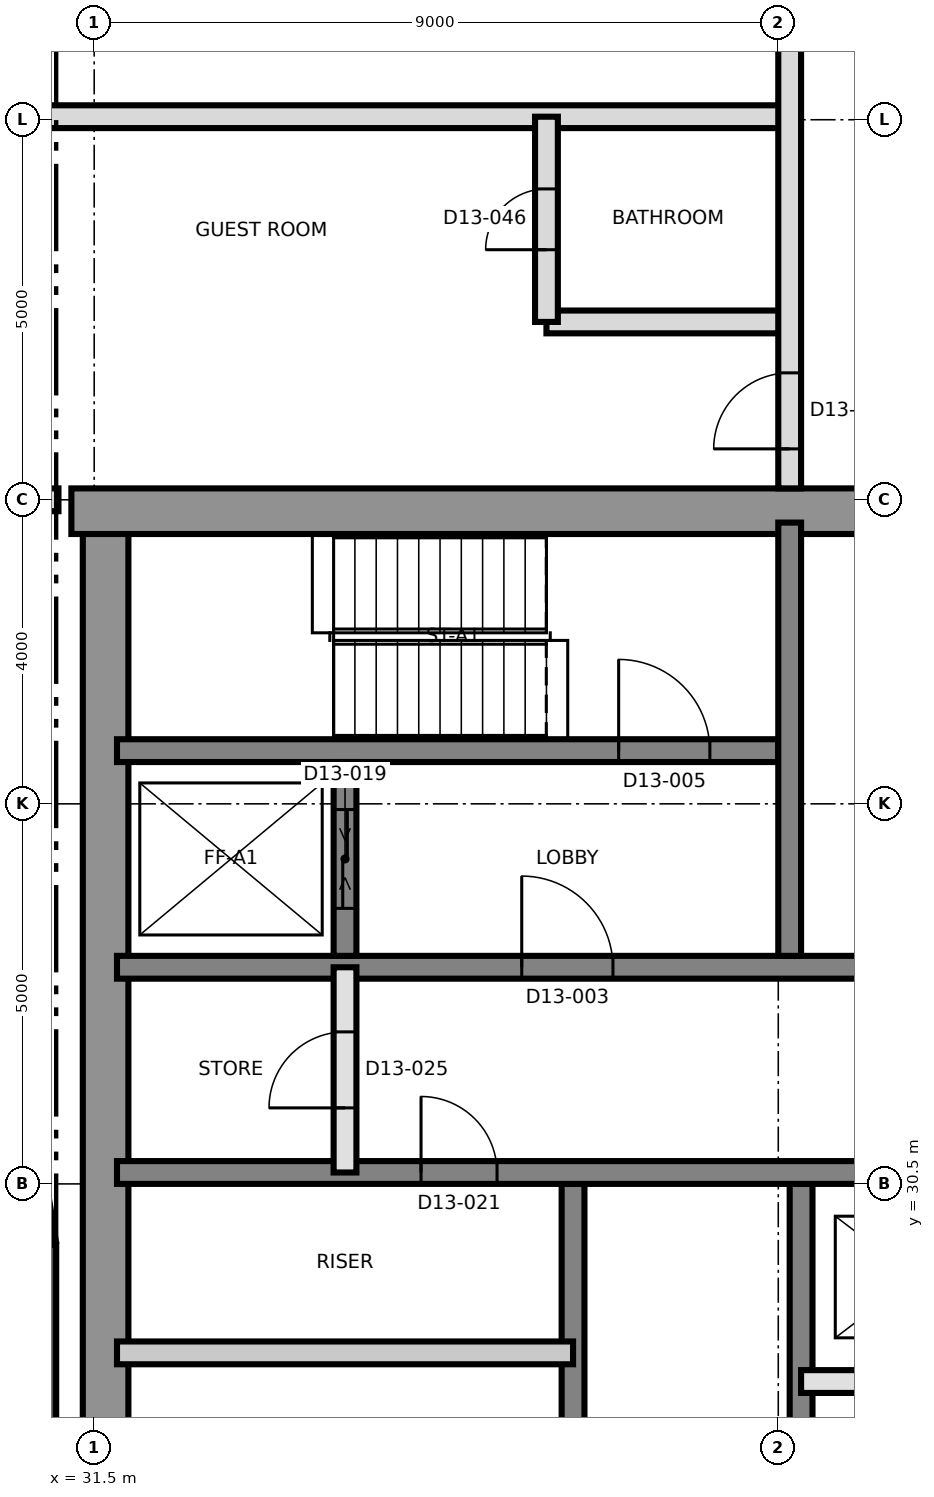
"""IFC4 building model, lengths in metres.
Left out: names, types, materials, properties, quantities, classifications, styles, units other than length and angle.
Written with IfcOpenShell. Run it as: python <this file> out.ifc"""

import sys

from ifc_helpers import new_model, si_unit, direction, frame, frame_2d, origin, place, context, subcontext, project, spatial, rectangle, extrude, element, fill, save


model = new_model("IFC4")
c1 = context("Model", 3, precision=1e-05, world=origin(), true_north=direction((0.0, 1.0)))
c2 = subcontext(c1, "Body", "Model", "MODEL_VIEW")
j1 = project(units=[si_unit("LENGTHUNIT", "METRE"), si_unit("PLANEANGLEUNIT", "RADIAN")], contexts=[c1])
p1 = place(None, origin())
s1 = spatial("IfcSite", under=j1, at=p1, CompositionType="ELEMENT")
p2 = place(p1, origin())
s2 = spatial("IfcBuilding", under=s1, at=p2, CompositionType="ELEMENT")
p3 = place(p2, frame((0.0, 0.0, 142.2)))
s3 = spatial("IfcBuildingStorey", under=s2, at=p3, CompositionType="ELEMENT", Elevation=142.2)
p4 = place(p3, frame((31.65, 21.8, 0.0), z_axis=(0.0, 0.0, 1.0), x_axis=(0.0, 1.0, 0.0)))
e1 = element("IfcWall", 1, at=p4, inside=s3, PredefinedType="SHEAR", context=c2, shape_type="SweptSolid", body=[
    extrude(rectangle(XDim=17.4, YDim=0.6, at=frame_2d((8.7, 0.0))), origin(), (0.0, 0.0, 1.0), 3.7),
])
p5 = place(p3, frame((31.2, 39.35, 0.0), z_axis=(0.0, 0.0, 1.0), x_axis=(1.0, 0.0, 0.0)))
e2 = element("IfcWall", 2, at=p5, inside=s3, PredefinedType="SHEAR", context=c2, shape_type="SweptSolid", body=[
    extrude(rectangle(XDim=27.0, YDim=0.6, at=frame_2d((13.5, 0.0))), origin(), (0.0, 0.0, 1.0), 3.7),
])
p6 = place(p5, frame((10.5, 0.0, 0.0)))
e3 = element("IfcOpeningElement", 3, at=p6, cuts=e2, PredefinedType="OPENING", context=c2, shape_type="SweptSolid", body=[
    extrude(rectangle(XDim=1.2, YDim=2.1, at=frame_2d((0.6, 1.05))), frame((0.0, 0.31, 0.0), z_axis=(0.0, -1.0, 0.0), x_axis=(1.0, 0.0, 0.0)), (0.0, 0.0, 1.0), 0.62),
])
p7 = place(p3, frame((37.8, 21.8, 0.0), z_axis=(0.0, 0.0, 1.0), x_axis=(0.0, 1.0, 0.0)))
e4 = element("IfcWall", 4, at=p7, inside=s3, PredefinedType="SHEAR", context=c2, shape_type="SweptSolid", body=[
    extrude(rectangle(XDim=8.7, YDim=0.3, at=frame_2d((4.35, 0.0))), origin(), (0.0, 0.0, 1.0), 3.7),
])
p8 = place(p7, frame((4.288, 0.0, 0.0)))
e5 = element("IfcOpeningElement", 5, at=p8, cuts=e4, PredefinedType="OPENING", context=c2, shape_type="SweptSolid", body=[
    extrude(rectangle(XDim=1.0, YDim=2.1, at=frame_2d((0.5, 1.05))), frame((0.0, 0.16, 0.0), z_axis=(0.0, -1.0, 0.0), x_axis=(1.0, 0.0, 0.0)), (0.0, 0.0, 1.0), 0.32),
])
p9 = place(p3, frame((40.8, 21.8, 0.0), z_axis=(0.0, 0.0, 1.0), x_axis=(0.0, 1.0, 0.0)))
e6 = element("IfcWall", 6, at=p9, inside=s3, PredefinedType="SHEAR", context=c2, shape_type="SweptSolid", body=[
    extrude(rectangle(XDim=8.7, YDim=0.3, at=frame_2d((4.35, 0.0))), origin(), (0.0, 0.0, 1.0), 3.7),
])
p10 = place(p9, frame((3.85, 0.0, 0.0)))
e7 = element("IfcOpeningElement", 7, at=p10, cuts=e6, PredefinedType="OPENING", context=c2, shape_type="SweptSolid", body=[
    extrude(rectangle(XDim=1.5, YDim=2.1, at=frame_2d((0.75, 1.05))), frame((0.0, 0.16, 0.0), z_axis=(0.0, -1.0, 0.0), x_axis=(1.0, 0.0, 0.0)), (0.0, 0.0, 1.0), 0.32),
])
p11 = place(p3, frame((31.8, 30.65, 0.0), z_axis=(0.0, 0.0, 1.0), x_axis=(1.0, 0.0, 0.0)))
e8 = element("IfcWall", 8, at=p11, inside=s3, PredefinedType="SHEAR", context=c2, shape_type="SweptSolid", body=[
    extrude(rectangle(XDim=26.4, YDim=0.3, at=frame_2d((13.2, 0.0))), origin(), (0.0, 0.0, 1.0), 3.7),
])
p12 = place(p11, frame((24.7, 0.0, 0.0)))
e9 = element("IfcOpeningElement", 9, at=p12, cuts=e8, PredefinedType="OPENING", context=c2, shape_type="SweptSolid", body=[
    extrude(rectangle(XDim=1.0, YDim=2.1, at=frame_2d((0.5, 1.05))), frame((0.0, 0.16, 0.0), z_axis=(0.0, -1.0, 0.0), x_axis=(1.0, 0.0, 0.0)), (0.0, 0.0, 1.0), 0.32),
])
p13 = place(p11, frame((4.0, 0.0, 0.0)))
e10 = element("IfcOpeningElement", 10, at=p13, cuts=e8, PredefinedType="OPENING", context=c2, shape_type="SweptSolid", body=[
    extrude(rectangle(XDim=1.0, YDim=2.1, at=frame_2d((0.5, 1.05))), frame((0.0, 0.16, 0.0), z_axis=(0.0, -1.0, 0.0), x_axis=(1.0, 0.0, 0.0)), (0.0, 0.0, 1.0), 0.32),
])
p14 = place(p3, frame((31.8, 33.35, 0.0), z_axis=(0.0, 0.0, 1.0), x_axis=(1.0, 0.0, 0.0)))
e11 = element("IfcWall", 11, at=p14, inside=s3, PredefinedType="SHEAR", context=c2, shape_type="SweptSolid", body=[
    extrude(rectangle(XDim=26.4, YDim=0.3, at=frame_2d((13.2, 0.0))), origin(), (0.0, 0.0, 1.0), 3.7),
])
p15 = place(p14, frame((13.85, 0.0, 0.0)))
e12 = element("IfcOpeningElement", 12, at=p15, cuts=e11, PredefinedType="OPENING", context=c2, shape_type="SweptSolid", body=[
    extrude(rectangle(XDim=1.4, YDim=2.1, at=frame_2d((0.7, 1.05))), frame((0.0, 0.16, 0.0), z_axis=(0.0, -1.0, 0.0), x_axis=(1.0, 0.0, 0.0)), (0.0, 0.0, 1.0), 0.32),
])
p16 = place(p14, frame((5.325, 0.0, 0.0)))
e13 = element("IfcOpeningElement", 13, at=p16, cuts=e11, PredefinedType="OPENING", context=c2, shape_type="SweptSolid", body=[
    extrude(rectangle(XDim=1.2, YDim=2.1, at=frame_2d((0.6, 1.05))), frame((0.0, 0.16, 0.0), z_axis=(0.0, -1.0, 0.0), x_axis=(1.0, 0.0, 0.0)), (0.0, 0.0, 1.0), 0.32),
])
p17 = place(p14, frame((19.875, 0.0, 0.0)))
e14 = element("IfcOpeningElement", 14, at=p17, cuts=e11, PredefinedType="OPENING", context=c2, shape_type="SweptSolid", body=[
    extrude(rectangle(XDim=1.2, YDim=2.1, at=frame_2d((0.6, 1.05))), frame((0.0, 0.16, 0.0), z_axis=(0.0, -1.0, 0.0), x_axis=(1.0, 0.0, 0.0)), (0.0, 0.0, 1.0), 0.32),
])
p18 = place(p3, frame((31.8, 36.2, 0.0), z_axis=(0.0, 0.0, 1.0), x_axis=(1.0, 0.0, 0.0)))
e15 = element("IfcWall", 15, at=p18, inside=s3, PredefinedType="SHEAR", context=c2, shape_type="SweptSolid", body=[
    extrude(rectangle(XDim=8.7, YDim=0.3, at=frame_2d((4.35, 0.0))), origin(), (0.0, 0.0, 1.0), 3.7),
])
p19 = place(p18, frame((6.6, 0.0, 0.0)))
e16 = element("IfcOpeningElement", 16, at=p19, cuts=e15, PredefinedType="OPENING", context=c2, shape_type="SweptSolid", body=[
    extrude(rectangle(XDim=1.2, YDim=2.1, at=frame_2d((0.6, 1.05))), frame((0.0, 0.16, 0.0), z_axis=(0.0, -1.0, 0.0), x_axis=(1.0, 0.0, 0.0)), (0.0, 0.0, 1.0), 0.32),
])
p20 = place(p3, frame((40.65, 33.5, 0.0), z_axis=(0.0, 0.0, 1.0), x_axis=(0.0, 1.0, 0.0)))
e17 = element("IfcWall", 17, at=p20, inside=s3, PredefinedType="SHEAR", context=c2, shape_type="SweptSolid", body=[
    extrude(rectangle(XDim=5.7, YDim=0.3, at=frame_2d((2.85, 0.0))), origin(), (0.0, 0.0, 1.0), 3.7),
])
p21 = place(p3, frame((34.8, 33.5, 0.0), z_axis=(0.0, 0.0, 1.0), x_axis=(0.0, 1.0, 0.0)))
e18 = element("IfcWall", 18, at=p21, inside=s3, PredefinedType="SHEAR", context=c2, shape_type="SweptSolid", body=[
    extrude(rectangle(XDim=2.55, YDim=0.3, at=frame_2d((1.275, 0.0))), origin(), (0.0, 0.0, 1.0), 3.7),
])
p22 = place(p21, frame((0.625, 0.0, 0.0)))
e19 = element("IfcOpeningElement", 19, at=p22, cuts=e18, PredefinedType="OPENING", context=c2, shape_type="SweptSolid", body=[
    extrude(rectangle(XDim=1.3, YDim=2.4, at=frame_2d((0.65, 1.2))), frame((0.0, 0.16, 0.0), z_axis=(0.0, -1.0, 0.0), x_axis=(1.0, 0.0, 0.0)), (0.0, 0.0, 1.0), 0.32),
])
p23 = place(p3, frame((30.85, 29.699, 0.0), z_axis=(0.0, 0.0, 1.0), x_axis=(0.0, -1.0, 0.0)))
e20 = element("IfcWall", 20, at=p23, inside=s3, PredefinedType="SOLIDWALL", context=c2, shape_type="SweptSolid", body=[
    extrude(rectangle(XDim=8.34, YDim=0.3, at=frame_2d((4.17, 0.0))), origin(), (0.0, 0.0, 1.0), 3.4),
])
p24 = place(p3, frame((30.152, 34.0, 0.0), z_axis=(0.0, 0.0, 1.0), x_axis=(0.160697303067, -0.987003736967, 0.0)))
e21 = element("IfcWall", 21, at=p24, inside=s3, PredefinedType="SOLIDWALL", context=c2, shape_type="SweptSolid", body=[
    extrude(rectangle(XDim=4.333, YDim=0.3, at=frame_2d((2.167, 0.0))), origin(), (0.0, 0.0, 1.0), 3.4),
])
p25 = place(p24, frame((0.366, 0.0, 0.9)))
e22 = element("IfcOpeningElement", 22, at=p25, cuts=e21, PredefinedType="OPENING", context=c2, shape_type="SweptSolid", body=[
    extrude(rectangle(XDim=3.6, YDim=1.5, at=frame_2d((1.8, 0.75))), frame((0.0, 0.16, 0.0), z_axis=(0.0, -1.0, 0.0), x_axis=(1.0, 0.0, 0.0)), (0.0, 0.0, 1.0), 0.32),
])
p26 = place(p3, frame((40.8, 27.9, 0.0), z_axis=(0.0, 0.0, 1.0), x_axis=(1.0, 0.0, 0.0)))
e23 = element("IfcWall", 23, at=p26, inside=s3, PredefinedType="SOLIDWALL", context=c2, shape_type="SweptSolid", body=[
    extrude(rectangle(XDim=6.0, YDim=0.3, at=frame_2d((3.0, 0.0))), origin(), (0.0, 0.0, 1.0), 3.4),
])
p27 = place(p26, frame((0.95, 0.0, 0.0)))
e24 = element("IfcOpeningElement", 24, at=p27, cuts=e23, PredefinedType="OPENING", context=c2, shape_type="SweptSolid", body=[
    extrude(rectangle(XDim=1.1, YDim=2.4, at=frame_2d((0.55, 1.2))), frame((0.0, 0.16, 0.0), z_axis=(0.0, -1.0, 0.0), x_axis=(1.0, 0.0, 0.0)), (0.0, 0.0, 1.0), 0.32),
])
p28 = place(p26, frame((3.95, 0.0, 0.0)))
e25 = element("IfcOpeningElement", 25, at=p28, cuts=e23, PredefinedType="OPENING", context=c2, shape_type="SweptSolid", body=[
    extrude(rectangle(XDim=1.1, YDim=2.4, at=frame_2d((0.55, 1.2))), frame((0.0, 0.16, 0.0), z_axis=(0.0, -1.0, 0.0), x_axis=(1.0, 0.0, 0.0)), (0.0, 0.0, 1.0), 0.32),
])
p29 = place(p3, frame((31.8, 28.277, 0.0), z_axis=(0.0, 0.0, 1.0), x_axis=(1.0, 0.0, 0.0)))
e26 = element("IfcWall", 26, at=p29, inside=s3, PredefinedType="PARTITIONING", context=c2, shape_type="SweptSolid", body=[
    extrude(rectangle(XDim=6.0, YDim=0.3, at=frame_2d((3.0, 0.0))), origin(), (0.0, 0.0, 1.0), 3.4),
])
p30 = place(p3, frame((34.8, 30.65, 0.0), z_axis=(0.0, 0.0, 1.0), x_axis=(0.0, 1.0, 0.0)))
e27 = element("IfcWall", 27, at=p30, inside=s3, PredefinedType="SOLIDWALL", context=c2, shape_type="SweptSolid", body=[
    extrude(rectangle(XDim=2.7, YDim=0.3, at=frame_2d((1.35, 0.0))), origin(), (0.0, 0.0, 1.0), 3.4),
])
p31 = place(p30, frame((0.85, 0.0, 0.0)))
e28 = element("IfcOpeningElement", 28, at=p31, cuts=e27, PredefinedType="OPENING", context=c2, shape_type="SweptSolid", body=[
    extrude(rectangle(XDim=1.0, YDim=2.1, at=frame_2d((0.5, 1.05))), frame((0.0, 0.16, 0.0), z_axis=(0.0, -1.0, 0.0), x_axis=(1.0, 0.0, 0.0)), (0.0, 0.0, 1.0), 0.32),
])
p32 = place(p3, frame((30.35, 39.5, 0.0), z_axis=(0.0, 0.0, 1.0), x_axis=(1.0, 0.0, 0.0)))
e29 = element("IfcWall", 29, at=p32, inside=s3, PredefinedType="PARTITIONING", context=c2, shape_type="SweptSolid", body=[
    extrude(rectangle(XDim=0.68, YDim=0.3, at=frame_2d((0.34, 0.0))), origin(), (0.0, 0.0, 1.0), 3.4),
])
p33 = place(p3, frame((37.45, 41.84, 0.0), z_axis=(0.0, 0.0, 1.0), x_axis=(1.0, 0.0, 0.0)))
e30 = element("IfcWall", 30, at=p33, inside=s3, PredefinedType="PARTITIONING", context=c2, shape_type="SweptSolid", body=[
    extrude(rectangle(XDim=3.2, YDim=0.3, at=frame_2d((1.6, 0.0))), origin(), (0.0, 0.0, 1.0), 3.4),
])
p34 = place(p3, frame((30.35, 44.54, 0.0), z_axis=(0.0, 0.0, 1.0), x_axis=(1.0, 0.0, 0.0)))
e31 = element("IfcWall", 31, at=p34, inside=s3, PredefinedType="PARTITIONING", context=c2, shape_type="SweptSolid", body=[
    extrude(rectangle(XDim=10.3, YDim=0.3, at=frame_2d((5.15, 0.0))), origin(), (0.0, 0.0, 1.0), 3.4),
])
p35 = place(p3, frame((37.45, 41.84, 0.0), z_axis=(0.0, 0.0, 1.0), x_axis=(0.0, 1.0, 0.0)))
e32 = element("IfcWall", 32, at=p35, inside=s3, PredefinedType="PARTITIONING", context=c2, shape_type="SweptSolid", body=[
    extrude(rectangle(XDim=2.7, YDim=0.3, at=frame_2d((1.35, 0.0))), origin(), (0.0, 0.0, 1.0), 3.4),
])
p36 = place(p35, frame((0.95, 0.0, 0.0)))
e33 = element("IfcOpeningElement", 33, at=p36, cuts=e32, PredefinedType="OPENING", context=c2, shape_type="SweptSolid", body=[
    extrude(rectangle(XDim=0.8, YDim=2.1, at=frame_2d((0.4, 1.05))), frame((0.0, 0.16, 0.0), z_axis=(0.0, -1.0, 0.0), x_axis=(1.0, 0.0, 0.0)), (0.0, 0.0, 1.0), 0.32),
])
p37 = place(p3, frame((40.65, 39.65, 0.0), z_axis=(0.0, 0.0, 1.0), x_axis=(0.0, 1.0, 0.0)))
e34 = element("IfcWall", 34, at=p37, inside=s3, PredefinedType="PARTITIONING", context=c2, shape_type="SweptSolid", body=[
    extrude(rectangle(XDim=37.24, YDim=0.3, at=frame_2d((18.62, 0.0))), origin(), (0.0, 0.0, 1.0), 3.4),
])
p38 = place(p37, frame((0.52, 0.0, 0.0)))
e35 = element("IfcOpeningElement", 35, at=p38, cuts=e34, PredefinedType="OPENING", context=c2, shape_type="SweptSolid", body=[
    extrude(rectangle(XDim=1.0, YDim=2.1, at=frame_2d((0.5, 1.05))), frame((0.0, 0.16, 0.0), z_axis=(0.0, -1.0, 0.0), x_axis=(1.0, 0.0, 0.0)), (0.0, 0.0, 1.0), 0.32),
])
p39 = place(p37, frame((6.37, 0.0, 0.0)))
e36 = element("IfcOpeningElement", 36, at=p39, cuts=e34, PredefinedType="OPENING", context=c2, shape_type="SweptSolid", body=[
    extrude(rectangle(XDim=1.0, YDim=2.1, at=frame_2d((0.5, 1.05))), frame((0.0, 0.16, 0.0), z_axis=(0.0, -1.0, 0.0), x_axis=(1.0, 0.0, 0.0)), (0.0, 0.0, 1.0), 0.32),
])
p40 = place(p37, frame((9.985, 0.0, 0.0)))
e37 = element("IfcOpeningElement", 37, at=p40, cuts=e34, PredefinedType="OPENING", context=c2, shape_type="SweptSolid", body=[
    extrude(rectangle(XDim=1.2, YDim=2.1, at=frame_2d((0.6, 1.05))), frame((0.0, 0.16, 0.0), z_axis=(0.0, -1.0, 0.0), x_axis=(1.0, 0.0, 0.0)), (0.0, 0.0, 1.0), 0.32),
])
p41 = place(p37, frame((13.235, 0.0, 0.0)))
e38 = element("IfcOpeningElement", 38, at=p41, cuts=e34, PredefinedType="OPENING", context=c2, shape_type="SweptSolid", body=[
    extrude(rectangle(XDim=1.0, YDim=2.1, at=frame_2d((0.5, 1.05))), frame((0.0, 0.16, 0.0), z_axis=(0.0, -1.0, 0.0), x_axis=(1.0, 0.0, 0.0)), (0.0, 0.0, 1.0), 0.32),
])
p42 = place(p37, frame((21.35, 0.0, 0.0)))
e39 = element("IfcOpeningElement", 39, at=p42, cuts=e34, PredefinedType="OPENING", context=c2, shape_type="SweptSolid", body=[
    extrude(rectangle(XDim=1.0, YDim=2.4, at=frame_2d((0.5, 1.2))), frame((0.0, 0.16, 0.0), z_axis=(0.0, -1.0, 0.0), x_axis=(1.0, 0.0, 0.0)), (0.0, 0.0, 1.0), 0.32),
])
p43 = place(p16, origin())
e40 = element("IfcDoor", 40, at=p43, inside=s3, OperationType="SINGLE_SWING_LEFT", PredefinedType="DOOR", context=c2, shape_type="SweptSolid", body=[
    extrude(rectangle(XDim=1.2, YDim=2.1, at=frame_2d((0.6, 1.05))), frame((0.0, 0.025, 0.0), z_axis=(0.0, -1.0, 0.0), x_axis=(1.0, 0.0, 0.0)), (0.0, 0.0, 1.0), 0.05),
])
fill(e13, e40)
p44 = place(p19, origin())
e41 = element("IfcDoor", 41, at=p44, inside=s3, OperationType="SINGLE_SWING_RIGHT", PredefinedType="DOOR", context=c2, shape_type="SweptSolid", body=[
    extrude(rectangle(XDim=1.2, YDim=2.1, at=frame_2d((0.6, 1.05))), frame((0.0, 0.025, 0.0), z_axis=(0.0, -1.0, 0.0), x_axis=(1.0, 0.0, 0.0)), (0.0, 0.0, 1.0), 0.05),
])
fill(e16, e41)
p45 = place(p22, origin())
e42 = element("IfcDoor", 42, at=p45, inside=s3, OperationType="SLIDING_TO_LEFT", PredefinedType="DOOR", context=c2, shape_type="SweptSolid", body=[
    extrude(rectangle(XDim=1.3, YDim=2.4, at=frame_2d((0.65, 1.2))), frame((0.0, 0.025, 0.0), z_axis=(0.0, -1.0, 0.0), x_axis=(1.0, 0.0, 0.0)), (0.0, 0.0, 1.0), 0.05),
])
fill(e19, e42)
p46 = place(p13, origin())
e43 = element("IfcDoor", 43, at=p46, inside=s3, OperationType="SINGLE_SWING_LEFT", PredefinedType="DOOR", context=c2, shape_type="SweptSolid", body=[
    extrude(rectangle(XDim=1.0, YDim=2.1, at=frame_2d((0.5, 1.05))), frame((0.0, 0.025, 0.0), z_axis=(0.0, -1.0, 0.0), x_axis=(1.0, 0.0, 0.0)), (0.0, 0.0, 1.0), 0.05),
])
fill(e10, e43)
p47 = place(p31, origin())
e44 = element("IfcDoor", 44, at=p47, inside=s3, OperationType="SINGLE_SWING_LEFT", PredefinedType="DOOR", context=c2, shape_type="SweptSolid", body=[
    extrude(rectangle(XDim=1.0, YDim=2.1, at=frame_2d((0.5, 1.05))), frame((0.0, 0.025, 0.0), z_axis=(0.0, -1.0, 0.0), x_axis=(1.0, 0.0, 0.0)), (0.0, 0.0, 1.0), 0.05),
])
fill(e28, e44)
p48 = place(p36, origin())
e45 = element("IfcDoor", 45, at=p48, inside=s3, OperationType="SINGLE_SWING_LEFT", PredefinedType="DOOR", context=c2, shape_type="SweptSolid", body=[
    extrude(rectangle(XDim=0.8, YDim=2.1, at=frame_2d((0.4, 1.05))), frame((0.0, 0.025, 0.0), z_axis=(0.0, -1.0, 0.0), x_axis=(1.0, 0.0, 0.0)), (0.0, 0.0, 1.0), 0.05),
])
fill(e33, e45)
p49 = place(p38, origin())
e46 = element("IfcDoor", 46, at=p49, inside=s3, OperationType="SINGLE_SWING_RIGHT", PredefinedType="DOOR", context=c2, shape_type="SweptSolid", body=[
    extrude(rectangle(XDim=1.0, YDim=2.1, at=frame_2d((0.5, 1.05))), frame((0.0, 0.025, 0.0), z_axis=(0.0, -1.0, 0.0), x_axis=(1.0, 0.0, 0.0)), (0.0, 0.0, 1.0), 0.05),
])
fill(e35, e46)
save(model, sys.argv[1])
